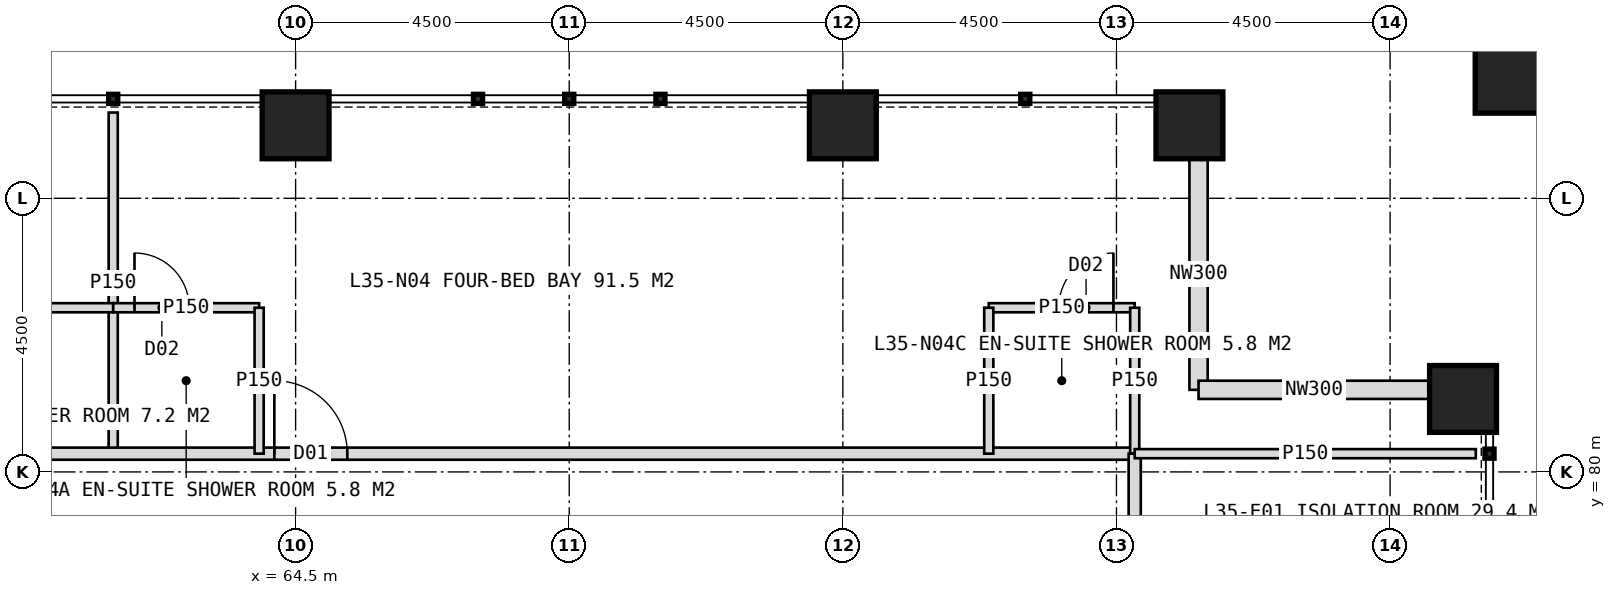
"""IFC4 building model, lengths in metres.
Left out: names, types, materials, properties, quantities, classifications, styles, units other than length and angle.
Written with IfcOpenShell. Run it as: python <this file> out.ifc"""

import sys

from ifc_helpers import new_model, si_unit, direction, frame, frame_2d, origin, origin_2d, place, context, subcontext, project, spatial, rectangle, hollow_rectangle, extrude, element, fill, save


model = new_model("IFC4")
c1 = context("Model", 3, precision=1e-05, world=origin(), true_north=direction((0.0, 1.0)))
c2 = subcontext(c1, "Body", "Model", "MODEL_VIEW")
j1 = project(units=[si_unit("LENGTHUNIT", "METRE"), si_unit("PLANEANGLEUNIT", "RADIAN")], contexts=[c1])
p1 = place(None, origin())
s1 = spatial("IfcSite", under=j1, at=p1, CompositionType="ELEMENT")
p2 = place(p1, origin())
s2 = spatial("IfcBuilding", under=s1, at=p2, CompositionType="ELEMENT")
p3 = place(p2, frame((0.0, 0.0, 148.0)))
s3 = spatial("IfcBuildingStorey", under=s2, at=p3, CompositionType="ELEMENT", Elevation=148.0)
for number, where, z_axis, x_axis in (
    (1, (64.5, 85.7, 0.0), (0.0, 0.0, 1.0), (1.0, 0.0, 0.0)),
    (2, (73.5, 85.7, 0.0), (0.0, 0.0, 1.0), (1.0, 0.0, 0.0)),
    (3, (79.2, 85.7, 0.0), (0.0, 0.0, 1.0), (1.0, 0.0, 0.0)),
    (4, (83.7, 81.2, 0.0), (0.0, 0.0, 1.0), (1.0, 0.0, 0.0)),
):
    element("IfcColumn", number, at=place(p3, frame(where, z_axis=z_axis, x_axis=x_axis)), inside=s3, PredefinedType="COLUMN", context=c2, shape_type="SweptSolid", body=[
        extrude(hollow_rectangle(XDim=1.1, YDim=1.1, WallThickness=0.1, at=origin_2d()), origin(), (0.0, 0.0, 1.0), 4.0),
    ])
p4 = place(p3, frame((84.6, 86.6, 0.0), z_axis=(0.0, 0.0, 1.0), x_axis=(1.0, 0.0, 0.0)))
e5 = element("IfcColumn", 5, at=p4, inside=s3, PredefinedType="COLUMN", context=c2, shape_type="SweptSolid", body=[
    extrude(hollow_rectangle(XDim=1.4, YDim=1.4, WallThickness=0.08, at=origin_2d()), origin(), (0.0, 0.0, 1.0), 4.0),
])
for number, where, z_axis, x_axis in (
    (6, (79.35, 85.15, 0.0), (0.0, 0.0, 1.0), (0.0, -1.0, 0.0)),
    (7, (79.35, 81.35, 0.0), (0.0, 0.0, 1.0), (1.0, 0.0, 0.0)),
):
    element("IfcWall", number, at=place(p3, frame(where, z_axis=z_axis, x_axis=x_axis)), inside=s3, PredefinedType="ELEMENTEDWALL", context=c2, shape_type="SweptSolid", body=[
        extrude(rectangle(XDim=3.8, YDim=0.3, at=frame_2d((1.9, 0.0))), origin(), (0.0, 0.0, 1.0), 4.0),
    ])
p5 = place(p3, frame((61.5, 80.3, 0.0), z_axis=(0.0, 0.0, 1.0), x_axis=(0.0, 1.0, 0.0)))
e8 = element("IfcWall", 8, at=p5, inside=s3, PredefinedType="PARTITIONING", context=c2, shape_type="SweptSolid", body=[
    extrude(rectangle(XDim=5.61, YDim=0.15, at=frame_2d((2.805, 0.0))), origin(), (0.0, 0.0, 1.0), 3.75),
])
p6 = place(p3, frame((41.7, 80.3, 0.0), z_axis=(0.0, 0.0, 1.0), x_axis=(1.0, 0.0, 0.0)))
e9 = element("IfcWall", 9, at=p6, inside=s3, PredefinedType="PARTITIONING", context=c2, shape_type="SweptSolid", body=[
    extrude(rectangle(XDim=36.6, YDim=0.2, at=frame_2d((18.3, 0.0))), origin(), (0.0, 0.0, 1.0), 3.75),
])
p7 = place(p6, frame((3.35, 0.0, 0.0)))
e10 = element("IfcOpeningElement", 10, at=p7, cuts=e9, PredefinedType="OPENING", context=c2, shape_type="SweptSolid", body=[
    extrude(rectangle(XDim=1.2, YDim=2.2, at=frame_2d((0.6, 1.1))), frame((0.0, 0.11, 0.0), z_axis=(0.0, -1.0, 0.0), x_axis=(1.0, 0.0, 0.0)), (0.0, 0.0, 1.0), 0.22),
])
p8 = place(p6, frame((8.8, 0.0, 0.0)))
e11 = element("IfcOpeningElement", 11, at=p8, cuts=e9, PredefinedType="OPENING", context=c2, shape_type="SweptSolid", body=[
    extrude(rectangle(XDim=1.0, YDim=2.1, at=frame_2d((0.5, 1.05))), frame((0.0, 0.11, 0.0), z_axis=(0.0, -1.0, 0.0), x_axis=(1.0, 0.0, 0.0)), (0.0, 0.0, 1.0), 0.22),
])
p9 = place(p6, frame((15.35, 0.0, 0.0)))
e12 = element("IfcOpeningElement", 12, at=p9, cuts=e9, PredefinedType="OPENING", context=c2, shape_type="SweptSolid", body=[
    extrude(rectangle(XDim=1.2, YDim=2.2, at=frame_2d((0.6, 1.1))), frame((0.0, 0.11, 0.0), z_axis=(0.0, -1.0, 0.0), x_axis=(1.0, 0.0, 0.0)), (0.0, 0.0, 1.0), 0.22),
])
p10 = place(p6, frame((22.45, 0.0, 0.0)))
e13 = element("IfcOpeningElement", 13, at=p10, cuts=e9, PredefinedType="OPENING", context=c2, shape_type="SweptSolid", body=[
    extrude(rectangle(XDim=1.2, YDim=2.2, at=frame_2d((0.6, 1.1))), frame((0.0, 0.11, 0.0), z_axis=(0.0, -1.0, 0.0), x_axis=(1.0, 0.0, 0.0)), (0.0, 0.0, 1.0), 0.22),
])
p11 = place(p3, frame((58.5, 82.7, 0.0), z_axis=(0.0, 0.0, 1.0), x_axis=(1.0, 0.0, 0.0)))
e14 = element("IfcWall", 14, at=p11, inside=s3, PredefinedType="PARTITIONING", context=c2, shape_type="SweptSolid", body=[
    extrude(rectangle(XDim=3.0, YDim=0.15, at=frame_2d((1.5, 0.0))), origin(), (0.0, 0.0, 1.0), 3.75),
])
p12 = place(p11, frame((0.35, 0.0, 0.0)))
e15 = element("IfcOpeningElement", 15, at=p12, cuts=e14, PredefinedType="OPENING", context=c2, shape_type="SweptSolid", body=[
    extrude(rectangle(XDim=0.9, YDim=2.1, at=frame_2d((0.45, 1.05))), frame((0.0, 0.085, 0.0), z_axis=(0.0, -1.0, 0.0), x_axis=(1.0, 0.0, 0.0)), (0.0, 0.0, 1.0), 0.17),
])
p13 = place(p3, frame((61.5, 82.7, 0.0), z_axis=(0.0, 0.0, 1.0), x_axis=(1.0, 0.0, 0.0)))
e16 = element("IfcWall", 16, at=p13, inside=s3, PredefinedType="PARTITIONING", context=c2, shape_type="SweptSolid", body=[
    extrude(rectangle(XDim=2.4, YDim=0.15, at=frame_2d((1.2, 0.0))), origin(), (0.0, 0.0, 1.0), 3.75),
])
p14 = place(p13, frame((0.35, 0.0, 0.0)))
e17 = element("IfcOpeningElement", 17, at=p14, cuts=e16, PredefinedType="OPENING", context=c2, shape_type="SweptSolid", body=[
    extrude(rectangle(XDim=0.9, YDim=2.1, at=frame_2d((0.45, 1.05))), frame((0.0, 0.085, 0.0), z_axis=(0.0, -1.0, 0.0), x_axis=(1.0, 0.0, 0.0)), (0.0, 0.0, 1.0), 0.17),
])
p15 = place(p3, frame((63.9, 80.3, 0.0), z_axis=(0.0, 0.0, 1.0), x_axis=(0.0, 1.0, 0.0)))
e18 = element("IfcWall", 18, at=p15, inside=s3, PredefinedType="PARTITIONING", context=c2, shape_type="SweptSolid", body=[
    extrude(rectangle(XDim=2.4, YDim=0.15, at=frame_2d((1.2, 0.0))), origin(), (0.0, 0.0, 1.0), 3.75),
])
p16 = place(p3, frame((75.9, 82.7, 0.0), z_axis=(0.0, 0.0, 1.0), x_axis=(1.0, 0.0, 0.0)))
e19 = element("IfcWall", 19, at=p16, inside=s3, PredefinedType="PARTITIONING", context=c2, shape_type="SweptSolid", body=[
    extrude(rectangle(XDim=2.4, YDim=0.15, at=frame_2d((1.2, 0.0))), origin(), (0.0, 0.0, 1.0), 3.75),
])
p17 = place(p16, frame((1.15, 0.0, 0.0)))
e20 = element("IfcOpeningElement", 20, at=p17, cuts=e19, PredefinedType="OPENING", context=c2, shape_type="SweptSolid", body=[
    extrude(rectangle(XDim=0.9, YDim=2.1, at=frame_2d((0.45, 1.05))), frame((0.0, 0.085, 0.0), z_axis=(0.0, -1.0, 0.0), x_axis=(1.0, 0.0, 0.0)), (0.0, 0.0, 1.0), 0.17),
])
for number, where, z_axis, x_axis in (
    (21, (75.9, 80.3, 0.0), (0.0, 0.0, 1.0), (0.0, 1.0, 0.0)),
    (22, (78.3, 80.3, 0.0), (0.0, 0.0, 1.0), (0.0, 1.0, 0.0)),
):
    element("IfcWall", number, at=place(p3, frame(where, z_axis=z_axis, x_axis=x_axis)), inside=s3, PredefinedType="PARTITIONING", context=c2, shape_type="SweptSolid", body=[
        extrude(rectangle(XDim=2.4, YDim=0.15, at=frame_2d((1.2, 0.0))), origin(), (0.0, 0.0, 1.0), 3.75),
    ])
p18 = place(p3, frame((78.3, 80.3, 0.0), z_axis=(0.0, 0.0, 1.0), x_axis=(0.0, -1.0, 0.0)))
e23 = element("IfcWall", 23, at=p18, inside=s3, PredefinedType="PARTITIONING", context=c2, shape_type="SweptSolid", body=[
    extrude(rectangle(XDim=36.6, YDim=0.2, at=frame_2d((18.3, 0.0))), origin(), (0.0, 0.0, 1.0), 3.75),
])
p19 = place(p18, frame((3.35, 0.0, 0.0)))
e24 = element("IfcOpeningElement", 24, at=p19, cuts=e23, PredefinedType="OPENING", context=c2, shape_type="SweptSolid", body=[
    extrude(rectangle(XDim=1.2, YDim=2.2, at=frame_2d((0.6, 1.1))), frame((0.0, 0.11, 0.0), z_axis=(0.0, -1.0, 0.0), x_axis=(1.0, 0.0, 0.0)), (0.0, 0.0, 1.0), 0.22),
])
p20 = place(p18, frame((11.05, 0.0, 0.0)))
e25 = element("IfcOpeningElement", 25, at=p20, cuts=e23, PredefinedType="OPENING", context=c2, shape_type="SweptSolid", body=[
    extrude(rectangle(XDim=1.2, YDim=2.2, at=frame_2d((0.6, 1.1))), frame((0.0, 0.11, 0.0), z_axis=(0.0, -1.0, 0.0), x_axis=(1.0, 0.0, 0.0)), (0.0, 0.0, 1.0), 0.22),
])
p21 = place(p18, frame((16.3, 0.0, 0.0)))
e26 = element("IfcOpeningElement", 26, at=p21, cuts=e23, PredefinedType="OPENING", context=c2, shape_type="SweptSolid", body=[
    extrude(rectangle(XDim=1.0, YDim=2.1, at=frame_2d((0.5, 1.05))), frame((0.0, 0.11, 0.0), z_axis=(0.0, -1.0, 0.0), x_axis=(1.0, 0.0, 0.0)), (0.0, 0.0, 1.0), 0.22),
])
p22 = place(p18, frame((21.55, 0.0, 0.0)))
e27 = element("IfcOpeningElement", 27, at=p22, cuts=e23, PredefinedType="OPENING", context=c2, shape_type="SweptSolid", body=[
    extrude(rectangle(XDim=1.2, YDim=2.2, at=frame_2d((0.6, 1.1))), frame((0.0, 0.11, 0.0), z_axis=(0.0, -1.0, 0.0), x_axis=(1.0, 0.0, 0.0)), (0.0, 0.0, 1.0), 0.22),
])
p23 = place(p18, frame((32.75, 0.0, 0.0)))
e28 = element("IfcOpeningElement", 28, at=p23, cuts=e23, PredefinedType="OPENING", context=c2, shape_type="SweptSolid", body=[
    extrude(rectangle(XDim=1.2, YDim=2.2, at=frame_2d((0.6, 1.1))), frame((0.0, 0.11, 0.0), z_axis=(0.0, -1.0, 0.0), x_axis=(1.0, 0.0, 0.0)), (0.0, 0.0, 1.0), 0.22),
])
p24 = place(p3, frame((78.3, 80.3, 0.0), z_axis=(0.0, 0.0, 1.0), x_axis=(1.0, 0.0, 0.0)))
e29 = element("IfcWall", 29, at=p24, inside=s3, PredefinedType="PARTITIONING", context=c2, shape_type="SweptSolid", body=[
    extrude(rectangle(XDim=5.61, YDim=0.15, at=frame_2d((2.805, 0.0))), origin(), (0.0, 0.0, 1.0), 3.75),
])
p25 = place(p10, origin())
e30 = element("IfcDoor", 30, at=p25, inside=s3, OperationType="SINGLE_SWING_LEFT", PredefinedType="DOOR", context=c2, shape_type="SweptSolid", body=[
    extrude(rectangle(XDim=1.2, YDim=2.2, at=frame_2d((0.6, 1.1))), frame((0.0, 0.025, 0.0), z_axis=(0.0, -1.0, 0.0), x_axis=(1.0, 0.0, 0.0)), (0.0, 0.0, 1.0), 0.05),
])
fill(e13, e30)
p26 = place(p14, origin())
e31 = element("IfcDoor", 31, at=p26, inside=s3, OperationType="SINGLE_SWING_LEFT", PredefinedType="DOOR", context=c2, shape_type="SweptSolid", body=[
    extrude(rectangle(XDim=0.9, YDim=2.1, at=frame_2d((0.45, 1.05))), frame((0.0, 0.025, 0.0), z_axis=(0.0, -1.0, 0.0), x_axis=(1.0, 0.0, 0.0)), (0.0, 0.0, 1.0), 0.05),
])
fill(e17, e31)
p27 = place(p17, origin())
e32 = element("IfcDoor", 32, at=p27, inside=s3, OperationType="SINGLE_SWING_RIGHT", PredefinedType="DOOR", context=c2, shape_type="SweptSolid", body=[
    extrude(rectangle(XDim=0.9, YDim=2.1, at=frame_2d((0.45, 1.05))), frame((0.0, 0.025, 0.0), z_axis=(0.0, -1.0, 0.0), x_axis=(1.0, 0.0, 0.0)), (0.0, 0.0, 1.0), 0.05),
])
fill(e20, e32)
save(model, sys.argv[1])
